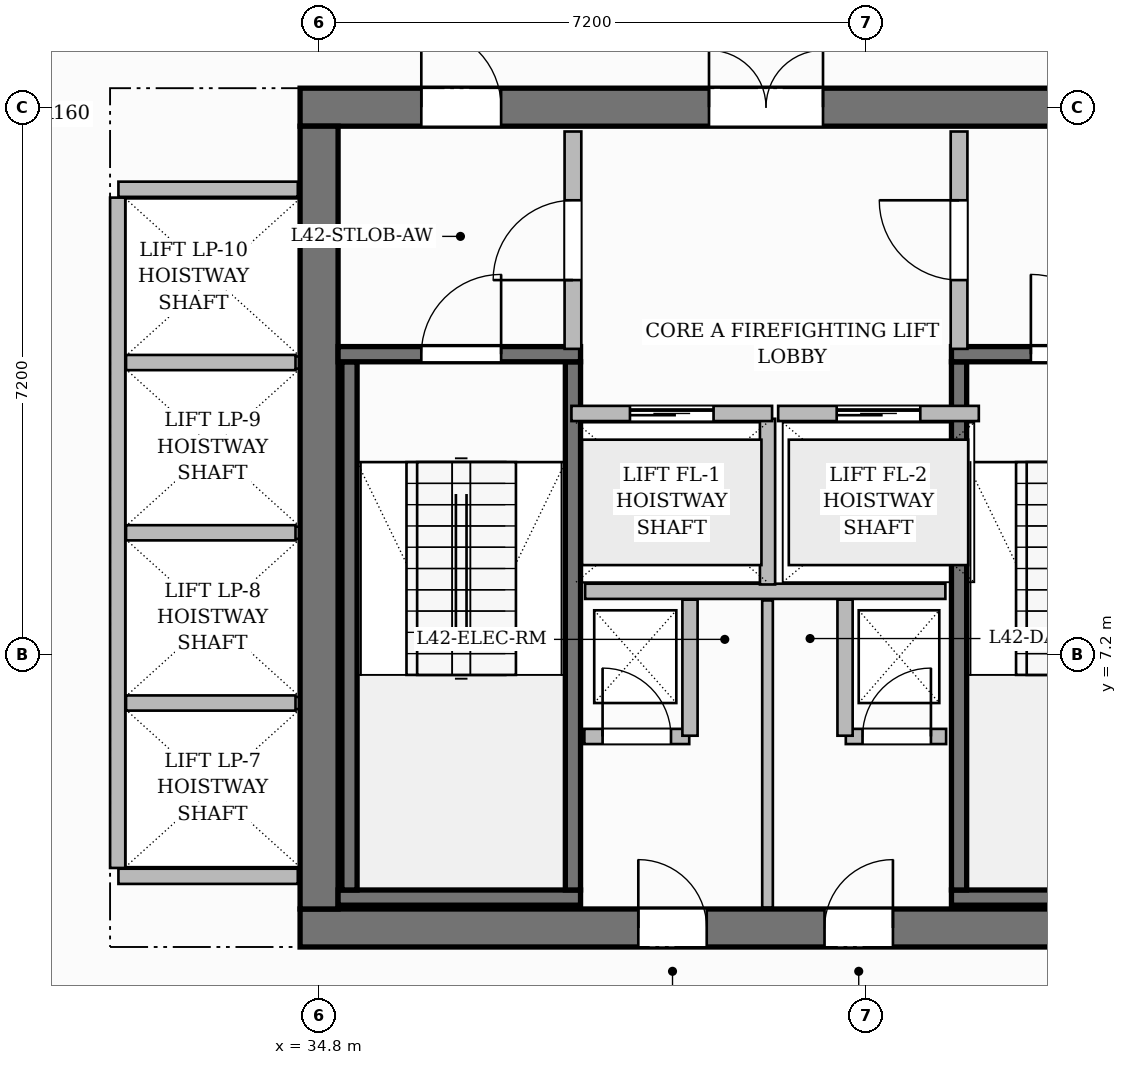
"""IFC4 building model, lengths in metres.
Left out: names, types, materials, properties, quantities, classifications, styles, units other than length and angle.
Written with IfcOpenShell. Run it as: python <this file> out.ifc"""

import sys

from ifc_helpers import new_model, si_unit, direction, frame, frame_2d, origin, place, context, subcontext, project, spatial, rectangle, extrude, source, transform, mapped, element, fill, save


model = new_model("IFC4")
c1 = context("Model", 3, precision=1e-05, world=origin(), true_north=direction((0.0, 1.0)))
c2 = subcontext(c1, "Body", "Model", "MODEL_VIEW")
j1 = project(units=[si_unit("LENGTHUNIT", "METRE"), si_unit("PLANEANGLEUNIT", "RADIAN")], contexts=[c1])
p1 = place(None, origin())
s1 = spatial("IfcSite", under=j1, at=p1, CompositionType="ELEMENT")
p2 = place(p1, origin())
s2 = spatial("IfcBuilding", under=s1, at=p2, CompositionType="ELEMENT")
p3 = place(p2, frame((0.0, 0.0, 169.55)))
s3 = spatial("IfcBuildingStorey", under=s2, at=p3, CompositionType="ELEMENT", Elevation=169.55)
p4 = place(p3, frame((34.55, 3.6, 0.0), z_axis=(0.0, 0.0, 1.0), x_axis=(1.0, 0.0, 0.0)))
e1 = element("IfcWall", 1, at=p4, inside=s3, PredefinedType="SHEAR", context=c2, shape_type="SweptSolid", body=[
    extrude(rectangle(XDim=15.5, YDim=0.5, at=frame_2d((7.75, 0.0))), origin(), (0.0, 0.0, 1.0), 3.85),
])
p5 = place(p4, frame((4.45, 0.0, 0.0)))
e2 = element("IfcOpeningElement", 2, at=p5, cuts=e1, PredefinedType="OPENING", context=c2, shape_type="SweptSolid", body=[
    extrude(rectangle(XDim=0.9, YDim=2.1, at=frame_2d((0.45, 1.05))), frame((0.0, 0.26, 0.0), z_axis=(0.0, -1.0, 0.0), x_axis=(1.0, 0.0, 0.0)), (0.0, 0.0, 1.0), 0.52),
])
p6 = place(p4, frame((6.9, 0.0, 0.0)))
e3 = element("IfcOpeningElement", 3, at=p6, cuts=e1, PredefinedType="OPENING", context=c2, shape_type="SweptSolid", body=[
    extrude(rectangle(XDim=0.9, YDim=2.1, at=frame_2d((0.45, 1.05))), frame((0.0, 0.26, 0.0), z_axis=(0.0, -1.0, 0.0), x_axis=(1.0, 0.0, 0.0)), (0.0, 0.0, 1.0), 0.52),
])
p7 = place(p3, frame((34.55, 14.4, 0.0), z_axis=(0.0, 0.0, 1.0), x_axis=(1.0, 0.0, 0.0)))
e4 = element("IfcWall", 4, at=p7, inside=s3, PredefinedType="SHEAR", context=c2, shape_type="SweptSolid", body=[
    extrude(rectangle(XDim=15.5, YDim=0.5, at=frame_2d((7.75, 0.0))), origin(), (0.0, 0.0, 1.0), 3.85),
])
p8 = place(p7, frame((5.38, 0.0, 0.0)))
e5 = element("IfcOpeningElement", 5, at=p8, cuts=e4, PredefinedType="OPENING", context=c2, shape_type="SweptSolid", body=[
    extrude(rectangle(XDim=1.5, YDim=2.2, at=frame_2d((0.75, 1.1))), frame((0.0, 0.26, 0.0), z_axis=(0.0, -1.0, 0.0), x_axis=(1.0, 0.0, 0.0)), (0.0, 0.0, 1.0), 0.52),
])
p9 = place(p7, frame((1.595, 0.0, 0.0)))
e6 = element("IfcOpeningElement", 6, at=p9, cuts=e4, PredefinedType="OPENING", context=c2, shape_type="SweptSolid", body=[
    extrude(rectangle(XDim=1.05, YDim=2.15, at=frame_2d((0.525, 1.075))), frame((0.0, 0.26, 0.0), z_axis=(0.0, -1.0, 0.0), x_axis=(1.0, 0.0, 0.0)), (0.0, 0.0, 1.0), 0.52),
])
p10 = place(p7, frame((11.225, 0.0, 0.0)))
e7 = element("IfcOpeningElement", 7, at=p10, cuts=e4, PredefinedType="OPENING", context=c2, shape_type="SweptSolid", body=[
    extrude(rectangle(XDim=1.05, YDim=2.15, at=frame_2d((0.525, 1.075))), frame((0.0, 0.26, 0.0), z_axis=(0.0, -1.0, 0.0), x_axis=(1.0, 0.0, 0.0)), (0.0, 0.0, 1.0), 0.52),
])
p11 = place(p3, frame((34.8, 3.85, 0.0), z_axis=(0.0, 0.0, 1.0), x_axis=(0.0, 1.0, 0.0)))
e8 = element("IfcWall", 8, at=p11, inside=s3, PredefinedType="SHEAR", context=c2, shape_type="SweptSolid", body=[
    extrude(rectangle(XDim=10.3, YDim=0.5, at=frame_2d((5.15, 0.0))), origin(), (0.0, 0.0, 1.0), 3.85),
])
p12 = place(p3, frame((35.05, 4.0, 0.0), z_axis=(0.0, 0.0, 1.0), x_axis=(1.0, 0.0, 0.0)))
e9 = element("IfcWall", 9, at=p12, inside=s3, PredefinedType="SHEAR", context=c2, shape_type="SweptSolid", body=[
    extrude(rectangle(XDim=3.19, YDim=0.2, at=frame_2d((1.595, 0.0))), origin(), (0.0, 0.0, 1.0), 3.85),
])
for number, where, z_axis, x_axis in (
    (10, (35.2, 4.1, 0.0), (0.0, 0.0, 1.0), (0.0, 1.0, 0.0)),
    (11, (38.14, 4.1, 0.0), (0.0, 0.0, 1.0), (0.0, 1.0, 0.0)),
):
    element("IfcWall", number, at=place(p3, frame(where, z_axis=z_axis, x_axis=x_axis)), inside=s3, PredefinedType="SHEAR", context=c2, shape_type="SweptSolid", body=[
        extrude(rectangle(XDim=6.95, YDim=0.2, at=frame_2d((3.475, 0.0))), origin(), (0.0, 0.0, 1.0), 3.85),
    ])
p13 = place(p3, frame((35.05, 11.15, 0.0), z_axis=(0.0, 0.0, 1.0), x_axis=(1.0, 0.0, 0.0)))
e12 = element("IfcWall", 12, at=p13, inside=s3, PredefinedType="SHEAR", context=c2, shape_type="SweptSolid", body=[
    extrude(rectangle(XDim=3.19, YDim=0.2, at=frame_2d((1.595, 0.0))), origin(), (0.0, 0.0, 1.0), 3.85),
])
p14 = place(p13, frame((1.095, 0.0, 0.0)))
e13 = element("IfcOpeningElement", 13, at=p14, cuts=e12, PredefinedType="OPENING", context=c2, shape_type="SweptSolid", body=[
    extrude(rectangle(XDim=1.05, YDim=2.2, at=frame_2d((0.525, 1.1))), frame((0.0, 0.11, 0.0), z_axis=(0.0, -1.0, 0.0), x_axis=(1.0, 0.0, 0.0)), (0.0, 0.0, 1.0), 0.22),
])
p15 = place(p3, frame((43.12, 4.0, 0.0), z_axis=(0.0, 0.0, 1.0), x_axis=(1.0, 0.0, 0.0)))
e14 = element("IfcWall", 14, at=p15, inside=s3, PredefinedType="SHEAR", context=c2, shape_type="SweptSolid", body=[
    extrude(rectangle(XDim=6.43, YDim=0.2, at=frame_2d((3.215, 0.0))), origin(), (0.0, 0.0, 1.0), 3.85),
])
p16 = place(p3, frame((43.22, 4.1, 0.0), z_axis=(0.0, 0.0, 1.0), x_axis=(0.0, 1.0, 0.0)))
e15 = element("IfcWall", 15, at=p16, inside=s3, PredefinedType="SHEAR", context=c2, shape_type="SweptSolid", body=[
    extrude(rectangle(XDim=6.95, YDim=0.2, at=frame_2d((3.475, 0.0))), origin(), (0.0, 0.0, 1.0), 3.85),
])
p17 = place(p3, frame((43.12, 11.15, 0.0), z_axis=(0.0, 0.0, 1.0), x_axis=(1.0, 0.0, 0.0)))
e16 = element("IfcWall", 16, at=p17, inside=s3, PredefinedType="SHEAR", context=c2, shape_type="SweptSolid", body=[
    extrude(rectangle(XDim=6.43, YDim=0.2, at=frame_2d((3.215, 0.0))), origin(), (0.0, 0.0, 1.0), 3.85),
])
p18 = place(p17, frame((1.045, 0.0, 0.0)))
e17 = element("IfcOpeningElement", 17, at=p18, cuts=e16, PredefinedType="OPENING", context=c2, shape_type="SweptSolid", body=[
    extrude(rectangle(XDim=1.05, YDim=2.2, at=frame_2d((0.525, 1.1))), frame((0.0, 0.11, 0.0), z_axis=(0.0, -1.0, 0.0), x_axis=(1.0, 0.0, 0.0)), (0.0, 0.0, 1.0), 0.22),
])
p19 = place(p17, frame((4.125, 0.0, 0.0)))
e18 = element("IfcOpeningElement", 18, at=p19, cuts=e16, PredefinedType="OPENING", context=c2, shape_type="SweptSolid", body=[
    extrude(rectangle(XDim=1.05, YDim=2.2, at=frame_2d((0.525, 1.1))), frame((0.0, 0.11, 0.0), z_axis=(0.0, -1.0, 0.0), x_axis=(1.0, 0.0, 0.0)), (0.0, 0.0, 1.0), 0.22),
])
p20 = place(p3, frame((38.3, 8.03, 0.0), z_axis=(0.0, 0.0, 1.0), x_axis=(1.0, 0.0, 0.0)))
e19 = element("IfcWall", 19, at=p20, inside=s3, PredefinedType="PARTITIONING", context=c2, shape_type="SweptSolid", body=[
    extrude(rectangle(XDim=4.74, YDim=0.2, at=frame_2d((2.37, 0.0))), origin(), (0.0, 0.0, 1.0), 3.6),
])
p21 = place(p3, frame((40.7, 8.12, 0.0), z_axis=(0.0, 0.0, 1.0), x_axis=(0.0, 1.0, 0.0)))
e20 = element("IfcWall", 20, at=p21, inside=s3, PredefinedType="PARTITIONING", context=c2, shape_type="SweptSolid", body=[
    extrude(rectangle(XDim=2.18, YDim=0.2, at=frame_2d((1.09, 0.0))), origin(), (0.0, 0.0, 1.0), 3.6),
])
p22 = place(p3, frame((38.14, 11.22, 0.0), z_axis=(0.0, 0.0, 1.0), x_axis=(0.0, 1.0, 0.0)))
e21 = element("IfcWall", 21, at=p22, inside=s3, PredefinedType="PARTITIONING", context=c2, shape_type="SweptSolid", body=[
    extrude(rectangle(XDim=2.86, YDim=0.22, at=frame_2d((1.43, 0.0))), origin(), (0.0, 0.0, 1.0), 3.6),
])
p23 = place(p22, frame((0.905, 0.0, 0.0)))
e22 = element("IfcOpeningElement", 22, at=p23, cuts=e21, PredefinedType="OPENING", context=c2, shape_type="SweptSolid", body=[
    extrude(rectangle(XDim=1.05, YDim=2.15, at=frame_2d((0.525, 1.075))), frame((0.0, 0.12, 0.0), z_axis=(0.0, -1.0, 0.0), x_axis=(1.0, 0.0, 0.0)), (0.0, 0.0, 1.0), 0.24),
])
p24 = place(p3, frame((43.22, 11.22, 0.0), z_axis=(0.0, 0.0, 1.0), x_axis=(0.0, 1.0, 0.0)))
e23 = element("IfcWall", 23, at=p24, inside=s3, PredefinedType="PARTITIONING", context=c2, shape_type="SweptSolid", body=[
    extrude(rectangle(XDim=2.86, YDim=0.22, at=frame_2d((1.43, 0.0))), origin(), (0.0, 0.0, 1.0), 3.6),
])
p25 = place(p24, frame((0.905, 0.0, 0.0)))
e24 = element("IfcOpeningElement", 24, at=p25, cuts=e23, PredefinedType="OPENING", context=c2, shape_type="SweptSolid", body=[
    extrude(rectangle(XDim=1.05, YDim=2.15, at=frame_2d((0.525, 1.075))), frame((0.0, 0.12, 0.0), z_axis=(0.0, -1.0, 0.0), x_axis=(1.0, 0.0, 0.0)), (0.0, 0.0, 1.0), 0.24),
])
p26 = place(p3, frame((38.29, 6.12, 0.0), z_axis=(0.0, 0.0, 1.0), x_axis=(1.0, 0.0, 0.0)))
e25 = element("IfcWall", 25, at=p26, inside=s3, PredefinedType="PARTITIONING", context=c2, shape_type="SweptSolid", body=[
    extrude(rectangle(XDim=1.38, YDim=0.2, at=frame_2d((0.69, 0.0))), origin(), (0.0, 0.0, 1.0), 3.6),
])
p27 = place(p26, frame((0.24, 0.0, 0.0)))
e26 = element("IfcOpeningElement", 26, at=p27, cuts=e25, PredefinedType="OPENING", context=c2, shape_type="SweptSolid", body=[
    extrude(rectangle(XDim=0.9, YDim=2.1, at=frame_2d((0.45, 1.05))), frame((0.0, 0.11, 0.0), z_axis=(0.0, -1.0, 0.0), x_axis=(1.0, 0.0, 0.0)), (0.0, 0.0, 1.0), 0.22),
])
p28 = place(p3, frame((39.68, 6.13, 0.0), z_axis=(0.0, 0.0, 1.0), x_axis=(0.0, 1.0, 0.0)))
e27 = element("IfcWall", 27, at=p28, inside=s3, PredefinedType="PARTITIONING", context=c2, shape_type="SweptSolid", body=[
    extrude(rectangle(XDim=1.79, YDim=0.2, at=frame_2d((0.895, 0.0))), origin(), (0.0, 0.0, 1.0), 3.6),
])
p29 = place(p3, frame((41.73, 6.12, 0.0), z_axis=(0.0, 0.0, 1.0), x_axis=(1.0, 0.0, 0.0)))
e28 = element("IfcWall", 28, at=p29, inside=s3, PredefinedType="PARTITIONING", context=c2, shape_type="SweptSolid", body=[
    extrude(rectangle(XDim=1.32, YDim=0.2, at=frame_2d((0.66, 0.0))), origin(), (0.0, 0.0, 1.0), 3.6),
])
p30 = place(p29, frame((0.22, 0.0, 0.0)))
e29 = element("IfcOpeningElement", 29, at=p30, cuts=e28, PredefinedType="OPENING", context=c2, shape_type="SweptSolid", body=[
    extrude(rectangle(XDim=0.9, YDim=2.1, at=frame_2d((0.45, 1.05))), frame((0.0, 0.11, 0.0), z_axis=(0.0, -1.0, 0.0), x_axis=(1.0, 0.0, 0.0)), (0.0, 0.0, 1.0), 0.22),
])
p31 = place(p3, frame((41.72, 6.13, 0.0), z_axis=(0.0, 0.0, 1.0), x_axis=(0.0, 1.0, 0.0)))
e30 = element("IfcWall", 30, at=p31, inside=s3, PredefinedType="PARTITIONING", context=c2, shape_type="SweptSolid", body=[
    extrude(rectangle(XDim=1.79, YDim=0.2, at=frame_2d((0.895, 0.0))), origin(), (0.0, 0.0, 1.0), 3.6),
])
p32 = place(p3, frame((40.7, 3.87, 0.0), z_axis=(0.0, 0.0, 1.0), x_axis=(0.0, 1.0, 0.0)))
e31 = element("IfcWall", 31, at=p32, inside=s3, PredefinedType="PARTITIONING", context=c2, shape_type="SweptSolid", body=[
    extrude(rectangle(XDim=4.04, YDim=0.14, at=frame_2d((2.02, 0.0))), origin(), (0.0, 0.0, 1.0), 3.6),
])
for number, where, z_axis, x_axis in (
    (32, (32.16, 4.28, 0.0), (0.0, 0.0, 1.0), (1.0, 0.0, 0.0)),
    (33, (32.16, 13.32, 0.0), (0.0, 0.0, 1.0), (1.0, 0.0, 0.0)),
):
    element("IfcWall", number, at=place(p3, frame(where, z_axis=z_axis, x_axis=x_axis)), inside=s3, PredefinedType="PARTITIONING", context=c2, shape_type="SweptSolid", body=[
        extrude(rectangle(XDim=2.36, YDim=0.2, at=frame_2d((1.18, 0.0))), origin(), (0.0, 0.0, 1.0), 3.6),
    ])
p33 = place(p3, frame((32.15, 4.39, 0.0), z_axis=(0.0, 0.0, 1.0), x_axis=(0.0, 1.0, 0.0)))
e34 = element("IfcWall", 34, at=p33, inside=s3, PredefinedType="PARTITIONING", context=c2, shape_type="SweptSolid", body=[
    extrude(rectangle(XDim=8.82, YDim=0.2, at=frame_2d((4.41, 0.0))), origin(), (0.0, 0.0, 1.0), 3.6),
])
for number, where, z_axis, x_axis in (
    (35, (32.26, 6.56, 0.0), (0.0, 0.0, 1.0), (1.0, 0.0, 0.0)),
    (36, (32.26, 8.8, 0.0), (0.0, 0.0, 1.0), (1.0, 0.0, 0.0)),
    (37, (32.26, 11.04, 0.0), (0.0, 0.0, 1.0), (1.0, 0.0, 0.0)),
):
    element("IfcWall", number, at=place(p3, frame(where, z_axis=z_axis, x_axis=x_axis)), inside=s3, PredefinedType="PARTITIONING", context=c2, shape_type="SweptSolid", body=[
        extrude(rectangle(XDim=2.23, YDim=0.2, at=frame_2d((1.115, 0.0))), origin(), (0.0, 0.0, 1.0), 3.6),
    ])
p34 = place(p3, frame((38.12, 10.37, 0.0), z_axis=(0.0, 0.0, 1.0), x_axis=(1.0, 0.0, 0.0)))
e38 = element("IfcWall", 38, at=p34, inside=s3, PredefinedType="PARTITIONING", context=c2, shape_type="SweptSolid", body=[
    extrude(rectangle(XDim=2.64, YDim=0.2, at=frame_2d((1.32, 0.0))), origin(), (0.0, 0.0, 1.0), 3.6),
])
p35 = place(p34, frame((0.77, 0.0, 0.0)))
e39 = element("IfcOpeningElement", 39, at=p35, cuts=e38, PredefinedType="OPENING", context=c2, shape_type="SweptSolid", body=[
    extrude(rectangle(XDim=1.1, YDim=2.2, at=frame_2d((0.55, 1.1))), frame((0.0, 0.11, 0.0), z_axis=(0.0, -1.0, 0.0), x_axis=(1.0, 0.0, 0.0)), (0.0, 0.0, 1.0), 0.22),
])
p36 = place(p3, frame((40.84, 10.37, 0.0), z_axis=(0.0, 0.0, 1.0), x_axis=(1.0, 0.0, 0.0)))
e40 = element("IfcWall", 40, at=p36, inside=s3, PredefinedType="PARTITIONING", context=c2, shape_type="SweptSolid", body=[
    extrude(rectangle(XDim=2.64, YDim=0.2, at=frame_2d((1.32, 0.0))), origin(), (0.0, 0.0, 1.0), 3.6),
])
p37 = place(p36, frame((0.77, 0.0, 0.0)))
e41 = element("IfcOpeningElement", 41, at=p37, cuts=e40, PredefinedType="OPENING", context=c2, shape_type="SweptSolid", body=[
    extrude(rectangle(XDim=1.1, YDim=2.2, at=frame_2d((0.55, 1.1))), frame((0.0, 0.11, 0.0), z_axis=(0.0, -1.0, 0.0), x_axis=(1.0, 0.0, 0.0)), (0.0, 0.0, 1.0), 0.22),
])
m1 = source(origin(), c2, "Body", "SweptSolid", [
    extrude(rectangle(XDim=1.05, YDim=2.2, at=frame_2d((0.525, 1.1))), frame((0.0, 0.025, 0.0), z_axis=(0.0, -1.0, 0.0), x_axis=(1.0, 0.0, 0.0)), (0.0, 0.0, 1.0), 0.05),
])
p38 = place(p14, origin())
e42 = element("IfcDoor", 42, at=p38, inside=s3, OperationType="SINGLE_SWING_RIGHT", PredefinedType="DOOR", context=c2, shape_type="MappedRepresentation", body=[
    mapped(m1, transform((0.0, 0.0, 0.0), scale=1.0)),
])
fill(e13, e42)
p39 = place(p18, origin())
e43 = element("IfcDoor", 43, at=p39, inside=s3, OperationType="SINGLE_SWING_LEFT", PredefinedType="DOOR", context=c2, shape_type="MappedRepresentation", body=[
    mapped(m1, transform((0.0, 0.0, 0.0), scale=1.0)),
])
fill(e17, e43)
m2 = source(origin(), c2, "Body", "SweptSolid", [
    extrude(rectangle(XDim=1.05, YDim=2.15, at=frame_2d((0.525, 1.075))), frame((0.0, 0.025, 0.0), z_axis=(0.0, -1.0, 0.0), x_axis=(1.0, 0.0, 0.0)), (0.0, 0.0, 1.0), 0.05),
])
p40 = place(p23, origin())
e44 = element("IfcDoor", 44, at=p40, inside=s3, OperationType="SINGLE_SWING_LEFT", PredefinedType="DOOR", context=c2, shape_type="MappedRepresentation", body=[
    mapped(m2, transform((0.0, 0.0, 0.0), scale=1.0)),
])
fill(e22, e44)
p41 = place(p25, origin())
e45 = element("IfcDoor", 45, at=p41, inside=s3, OperationType="SINGLE_SWING_RIGHT", PredefinedType="DOOR", context=c2, shape_type="MappedRepresentation", body=[
    mapped(m2, transform((0.0, 0.0, 0.0), scale=1.0)),
])
fill(e24, e45)
m3 = source(origin(), c2, "Body", "SweptSolid", [
    extrude(rectangle(XDim=1.5, YDim=2.2, at=frame_2d((0.75, 1.1))), frame((0.0, 0.025, 0.0), z_axis=(0.0, -1.0, 0.0), x_axis=(1.0, 0.0, 0.0)), (0.0, 0.0, 1.0), 0.05),
])
p42 = place(p8, origin())
e46 = element("IfcDoor", 46, at=p42, inside=s3, OperationType="DOUBLE_DOOR_SINGLE_SWING", PredefinedType="DOOR", context=c2, shape_type="MappedRepresentation", body=[
    mapped(m3, transform((0.0, 0.0, 0.0), scale=1.0)),
])
fill(e5, e46)
p43 = place(p9, origin())
e47 = element("IfcDoor", 47, at=p43, inside=s3, OperationType="SINGLE_SWING_LEFT", PredefinedType="DOOR", context=c2, shape_type="MappedRepresentation", body=[
    mapped(m2, transform((0.0, 0.0, 0.0), scale=1.0)),
])
fill(e6, e47)
m4 = source(origin(), c2, "Body", "SweptSolid", [
    extrude(rectangle(XDim=0.9, YDim=2.1, at=frame_2d((0.45, 1.05))), frame((0.0, 0.025, 0.0), z_axis=(0.0, -1.0, 0.0), x_axis=(1.0, 0.0, 0.0)), (0.0, 0.0, 1.0), 0.05),
])
p44 = place(p27, origin())
e48 = element("IfcDoor", 48, at=p44, inside=s3, OperationType="SINGLE_SWING_LEFT", PredefinedType="DOOR", context=c2, shape_type="MappedRepresentation", body=[
    mapped(m4, transform((0.0, 0.0, 0.0), scale=1.0)),
])
fill(e26, e48)
p45 = place(p30, origin())
e49 = element("IfcDoor", 49, at=p45, inside=s3, OperationType="SINGLE_SWING_RIGHT", PredefinedType="DOOR", context=c2, shape_type="MappedRepresentation", body=[
    mapped(m4, transform((0.0, 0.0, 0.0), scale=1.0)),
])
fill(e29, e49)
p46 = place(p5, origin())
e50 = element("IfcDoor", 50, at=p46, inside=s3, OperationType="SINGLE_SWING_LEFT", PredefinedType="DOOR", context=c2, shape_type="MappedRepresentation", body=[
    mapped(m4, transform((0.0, 0.0, 0.0), scale=1.0)),
])
fill(e2, e50)
p47 = place(p6, origin())
e51 = element("IfcDoor", 51, at=p47, inside=s3, OperationType="SINGLE_SWING_RIGHT", PredefinedType="DOOR", context=c2, shape_type="MappedRepresentation", body=[
    mapped(m4, transform((0.0, 0.0, 0.0), scale=1.0)),
])
fill(e3, e51)
m5 = source(origin(), c2, "Body", "SweptSolid", [
    extrude(rectangle(XDim=1.1, YDim=2.2, at=frame_2d((0.55, 1.1))), frame((0.0, 0.025, 0.0), z_axis=(0.0, -1.0, 0.0), x_axis=(1.0, 0.0, 0.0)), (0.0, 0.0, 1.0), 0.05),
])
p48 = place(p35, origin())
e52 = element("IfcDoor", 52, at=p48, inside=s3, OperationType="SLIDING_TO_LEFT", PredefinedType="DOOR", context=c2, shape_type="MappedRepresentation", body=[
    mapped(m5, transform((0.0, 0.0, 0.0), scale=1.0)),
])
fill(e39, e52)
p49 = place(p37, origin())
e53 = element("IfcDoor", 53, at=p49, inside=s3, OperationType="SLIDING_TO_LEFT", PredefinedType="DOOR", context=c2, shape_type="MappedRepresentation", body=[
    mapped(m5, transform((0.0, 0.0, 0.0), scale=1.0)),
])
fill(e41, e53)
save(model, sys.argv[1])
